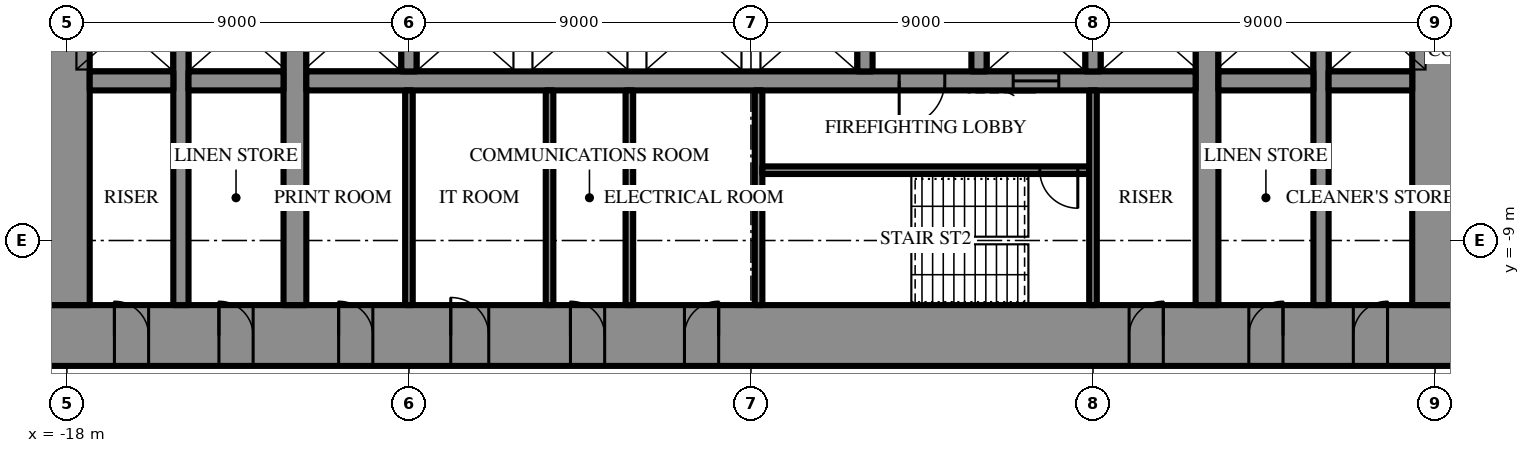
"""IFC4 building model, lengths in metres.
Left out: names, types, materials, properties, quantities, classifications, styles, units other than length and angle.
Written with IfcOpenShell. Run it as: python <this file> out.ifc"""

import sys

from ifc_helpers import new_model, si_unit, direction, frame, frame_2d, origin, place, context, subcontext, project, spatial, rectangle, extrude, element, fill, save


model = new_model("IFC4")
c1 = context("Model", 3, precision=1e-05, world=origin(), true_north=direction((0.0, 1.0)))
c2 = subcontext(c1, "Body", "Model", "MODEL_VIEW")
j1 = project(units=[si_unit("LENGTHUNIT", "METRE"), si_unit("PLANEANGLEUNIT", "RADIAN")], contexts=[c1])
p1 = place(None, origin())
s1 = spatial("IfcSite", under=j1, at=p1, CompositionType="ELEMENT")
p2 = place(p1, origin())
s2 = spatial("IfcBuilding", under=s1, at=p2, CompositionType="ELEMENT")
p3 = place(p2, frame((0.0, 0.0, 94.9)))
s3 = spatial("IfcBuildingStorey", under=s2, at=p3, CompositionType="ELEMENT", Elevation=94.9)
p4 = place(p3, frame((18.6, -11.5, 0.0), z_axis=(0.0, 0.0, 1.0), x_axis=(-1.0, 0.0, 0.0)))
e1 = element("IfcWall", 1, at=p4, inside=s3, PredefinedType="SHEAR", context=c2, shape_type="SweptSolid", body=[
    extrude(rectangle(XDim=37.2, YDim=1.6, at=frame_2d((18.6, 0.0))), origin(), (0.0, 0.0, 1.0), 4.2),
])
p5 = place(p4, frame((19.45, 0.0, 0.0)))
e2 = element("IfcOpeningElement", 2, at=p5, cuts=e1, PredefinedType="OPENING", context=c2, shape_type="SweptSolid", body=[
    extrude(rectangle(XDim=0.9, YDim=2.2, at=frame_2d((0.45, 1.1))), frame((0.0, 0.81, 0.0), z_axis=(0.0, -1.0, 0.0), x_axis=(1.0, 0.0, 0.0)), (0.0, 0.0, 1.0), 1.62),
])
p6 = place(p4, frame((22.45, 0.0, 0.0)))
e3 = element("IfcOpeningElement", 3, at=p6, cuts=e1, PredefinedType="OPENING", context=c2, shape_type="SweptSolid", body=[
    extrude(rectangle(XDim=0.9, YDim=2.2, at=frame_2d((0.45, 1.1))), frame((0.0, 0.81, 0.0), z_axis=(0.0, -1.0, 0.0), x_axis=(1.0, 0.0, 0.0)), (0.0, 0.0, 1.0), 1.62),
])
p7 = place(p4, frame((25.5, 0.0, 0.0)))
e4 = element("IfcOpeningElement", 4, at=p7, cuts=e1, PredefinedType="OPENING", context=c2, shape_type="SweptSolid", body=[
    extrude(rectangle(XDim=1.0, YDim=2.2, at=frame_2d((0.5, 1.1))), frame((0.0, 0.81, 0.0), z_axis=(0.0, -1.0, 0.0), x_axis=(1.0, 0.0, 0.0)), (0.0, 0.0, 1.0), 1.62),
])
p8 = place(p4, frame((1.85, 0.0, 0.0)))
e5 = element("IfcOpeningElement", 5, at=p8, cuts=e1, PredefinedType="OPENING", context=c2, shape_type="SweptSolid", body=[
    extrude(rectangle(XDim=0.9, YDim=2.2, at=frame_2d((0.45, 1.1))), frame((0.0, 0.81, 0.0), z_axis=(0.0, -1.0, 0.0), x_axis=(1.0, 0.0, 0.0)), (0.0, 0.0, 1.0), 1.62),
])
p9 = place(p4, frame((4.6, 0.0, 0.0)))
e6 = element("IfcOpeningElement", 6, at=p9, cuts=e1, PredefinedType="OPENING", context=c2, shape_type="SweptSolid", body=[
    extrude(rectangle(XDim=0.9, YDim=2.2, at=frame_2d((0.45, 1.1))), frame((0.0, 0.81, 0.0), z_axis=(0.0, -1.0, 0.0), x_axis=(1.0, 0.0, 0.0)), (0.0, 0.0, 1.0), 1.62),
])
p10 = place(p4, frame((7.75, 0.0, 0.0)))
e7 = element("IfcOpeningElement", 7, at=p10, cuts=e1, PredefinedType="OPENING", context=c2, shape_type="SweptSolid", body=[
    extrude(rectangle(XDim=0.9, YDim=2.2, at=frame_2d((0.45, 1.1))), frame((0.0, 0.81, 0.0), z_axis=(0.0, -1.0, 0.0), x_axis=(1.0, 0.0, 0.0)), (0.0, 0.0, 1.0), 1.62),
])
p11 = place(p4, frame((28.55, 0.0, 0.0)))
e8 = element("IfcOpeningElement", 8, at=p11, cuts=e1, PredefinedType="OPENING", context=c2, shape_type="SweptSolid", body=[
    extrude(rectangle(XDim=0.9, YDim=2.2, at=frame_2d((0.45, 1.1))), frame((0.0, 0.81, 0.0), z_axis=(0.0, -1.0, 0.0), x_axis=(1.0, 0.0, 0.0)), (0.0, 0.0, 1.0), 1.62),
])
p12 = place(p4, frame((31.7, 0.0, 0.0)))
e9 = element("IfcOpeningElement", 9, at=p12, cuts=e1, PredefinedType="OPENING", context=c2, shape_type="SweptSolid", body=[
    extrude(rectangle(XDim=0.9, YDim=2.2, at=frame_2d((0.45, 1.1))), frame((0.0, 0.81, 0.0), z_axis=(0.0, -1.0, 0.0), x_axis=(1.0, 0.0, 0.0)), (0.0, 0.0, 1.0), 1.62),
])
p13 = place(p4, frame((34.45, 0.0, 0.0)))
e10 = element("IfcOpeningElement", 10, at=p13, cuts=e1, PredefinedType="OPENING", context=c2, shape_type="SweptSolid", body=[
    extrude(rectangle(XDim=0.9, YDim=2.2, at=frame_2d((0.45, 1.1))), frame((0.0, 0.81, 0.0), z_axis=(0.0, -1.0, 0.0), x_axis=(1.0, 0.0, 0.0)), (0.0, 0.0, 1.0), 1.62),
])
p14 = place(p3, frame((18.0, -10.7, 0.0), z_axis=(0.0, 0.0, 1.0), x_axis=(0.0, 1.0, 0.0)))
e11 = element("IfcWall", 11, at=p14, inside=s3, PredefinedType="SHEAR", context=c2, shape_type="SweptSolid", body=[
    extrude(rectangle(XDim=21.4, YDim=1.2, at=frame_2d((10.7, 0.0))), origin(), (0.0, 0.0, 1.0), 4.2),
])
p15 = place(p14, frame((9.8, 0.0, 0.0)))
e12 = element("IfcOpeningElement", 12, at=p15, cuts=e11, PredefinedType="OPENING", context=c2, shape_type="SweptSolid", body=[
    extrude(rectangle(XDim=1.8, YDim=2.4, at=frame_2d((0.9, 1.2))), frame((0.0, 0.61, 0.0), z_axis=(0.0, -1.0, 0.0), x_axis=(1.0, 0.0, 0.0)), (0.0, 0.0, 1.0), 1.22),
])
p16 = place(p3, frame((-18.0, 10.7, 0.0), z_axis=(0.0, 0.0, 1.0), x_axis=(0.0, -1.0, 0.0)))
e13 = element("IfcWall", 13, at=p16, inside=s3, PredefinedType="SHEAR", context=c2, shape_type="SweptSolid", body=[
    extrude(rectangle(XDim=21.4, YDim=1.2, at=frame_2d((10.7, 0.0))), origin(), (0.0, 0.0, 1.0), 4.2),
])
p17 = place(p16, frame((9.8, 0.0, 0.0)))
e14 = element("IfcOpeningElement", 14, at=p17, cuts=e13, PredefinedType="OPENING", context=c2, shape_type="SweptSolid", body=[
    extrude(rectangle(XDim=1.8, YDim=2.4, at=frame_2d((0.9, 1.2))), frame((0.0, 0.61, 0.0), z_axis=(0.0, -1.0, 0.0), x_axis=(1.0, 0.0, 0.0)), (0.0, 0.0, 1.0), 1.22),
])
p18 = place(p3, frame((12.0, -10.7, 0.0), z_axis=(0.0, 0.0, 1.0), x_axis=(0.0, 1.0, 0.0)))
e15 = element("IfcWall", 15, at=p18, inside=s3, PredefinedType="SHEAR", context=c2, shape_type="SweptSolid", body=[
    extrude(rectangle(XDim=21.4, YDim=0.6, at=frame_2d((10.7, 0.0))), origin(), (0.0, 0.0, 1.0), 4.2),
])
p19 = place(p18, frame((9.8, 0.0, 0.0)))
e16 = element("IfcOpeningElement", 16, at=p19, cuts=e15, PredefinedType="OPENING", context=c2, shape_type="SweptSolid", body=[
    extrude(rectangle(XDim=1.8, YDim=2.4, at=frame_2d((0.9, 1.2))), frame((0.0, 0.31, 0.0), z_axis=(0.0, -1.0, 0.0), x_axis=(1.0, 0.0, 0.0)), (0.0, 0.0, 1.0), 0.62),
])
p20 = place(p3, frame((-12.0, -10.7, 0.0), z_axis=(0.0, 0.0, 1.0), x_axis=(0.0, 1.0, 0.0)))
e17 = element("IfcWall", 17, at=p20, inside=s3, PredefinedType="SHEAR", context=c2, shape_type="SweptSolid", body=[
    extrude(rectangle(XDim=21.4, YDim=0.6, at=frame_2d((10.7, 0.0))), origin(), (0.0, 0.0, 1.0), 4.2),
])
p21 = place(p20, frame((9.8, 0.0, 0.0)))
e18 = element("IfcOpeningElement", 18, at=p21, cuts=e17, PredefinedType="OPENING", context=c2, shape_type="SweptSolid", body=[
    extrude(rectangle(XDim=1.8, YDim=2.4, at=frame_2d((0.9, 1.2))), frame((0.0, 0.31, 0.0), z_axis=(0.0, -1.0, 0.0), x_axis=(1.0, 0.0, 0.0)), (0.0, 0.0, 1.0), 0.62),
])
p22 = place(p3, frame((15.0, -10.7, 0.0), z_axis=(0.0, 0.0, 1.0), x_axis=(0.0, 1.0, 0.0)))
e19 = element("IfcWall", 19, at=p22, inside=s3, PredefinedType="SHEAR", context=c2, shape_type="SweptSolid", body=[
    extrude(rectangle(XDim=21.4, YDim=0.4, at=frame_2d((10.7, 0.0))), origin(), (0.0, 0.0, 1.0), 4.2),
])
p23 = place(p22, frame((9.8, 0.0, 0.0)))
e20 = element("IfcOpeningElement", 20, at=p23, cuts=e19, PredefinedType="OPENING", context=c2, shape_type="SweptSolid", body=[
    extrude(rectangle(XDim=1.8, YDim=2.4, at=frame_2d((0.9, 1.2))), frame((0.0, 0.21, 0.0), z_axis=(0.0, -1.0, 0.0), x_axis=(1.0, 0.0, 0.0)), (0.0, 0.0, 1.0), 0.42),
])
p24 = place(p3, frame((-15.0, -10.7, 0.0), z_axis=(0.0, 0.0, 1.0), x_axis=(0.0, 1.0, 0.0)))
e21 = element("IfcWall", 21, at=p24, inside=s3, PredefinedType="SHEAR", context=c2, shape_type="SweptSolid", body=[
    extrude(rectangle(XDim=21.4, YDim=0.4, at=frame_2d((10.7, 0.0))), origin(), (0.0, 0.0, 1.0), 4.2),
])
p25 = place(p24, frame((9.8, 0.0, 0.0)))
e22 = element("IfcOpeningElement", 22, at=p25, cuts=e21, PredefinedType="OPENING", context=c2, shape_type="SweptSolid", body=[
    extrude(rectangle(XDim=1.8, YDim=2.4, at=frame_2d((0.9, 1.2))), frame((0.0, 0.21, 0.0), z_axis=(0.0, -1.0, 0.0), x_axis=(1.0, 0.0, 0.0)), (0.0, 0.0, 1.0), 0.42),
])
p26 = place(p3, frame((17.4, -4.8, 0.0), z_axis=(0.0, 0.0, 1.0), x_axis=(-1.0, 0.0, 0.0)))
e23 = element("IfcWall", 23, at=p26, inside=s3, PredefinedType="SHEAR", context=c2, shape_type="SweptSolid", body=[
    extrude(rectangle(XDim=2.2, YDim=0.5, at=frame_2d((1.1, 0.0))), origin(), (0.0, 0.0, 1.0), 4.2),
])
p27 = place(p3, frame((14.8, -4.8, 0.0), z_axis=(0.0, 0.0, 1.0), x_axis=(-1.0, 0.0, 0.0)))
e24 = element("IfcWall", 24, at=p27, inside=s3, PredefinedType="SHEAR", context=c2, shape_type="SweptSolid", body=[
    extrude(rectangle(XDim=2.5, YDim=0.5, at=frame_2d((1.25, 0.0))), origin(), (0.0, 0.0, 1.0), 4.2),
])
p28 = place(p3, frame((11.7, -4.8, 0.0), z_axis=(0.0, 0.0, 1.0), x_axis=(-1.0, 0.0, 0.0)))
e25 = element("IfcWall", 25, at=p28, inside=s3, PredefinedType="SHEAR", context=c2, shape_type="SweptSolid", body=[
    extrude(rectangle(XDim=23.4, YDim=0.5, at=frame_2d((11.7, 0.0))), origin(), (0.0, 0.0, 1.0), 4.2),
])
p29 = place(p28, frame((6.6, 0.0, 0.0)))
e26 = element("IfcOpeningElement", 26, at=p29, cuts=e25, PredefinedType="OPENING", context=c2, shape_type="SweptSolid", body=[
    extrude(rectangle(XDim=1.2, YDim=2.2, at=frame_2d((0.6, 1.1))), frame((0.0, 0.26, 0.0), z_axis=(0.0, -1.0, 0.0), x_axis=(1.0, 0.0, 0.0)), (0.0, 0.0, 1.0), 0.52),
])
p30 = place(p28, frame((3.6, 0.0, 0.0)))
e27 = element("IfcOpeningElement", 27, at=p30, cuts=e25, PredefinedType="OPENING", context=c2, shape_type="SweptSolid", body=[
    extrude(rectangle(XDim=1.2, YDim=2.2, at=frame_2d((0.6, 1.1))), frame((0.0, 0.26, 0.0), z_axis=(0.0, -1.0, 0.0), x_axis=(1.0, 0.0, 0.0)), (0.0, 0.0, 1.0), 0.52),
])
p31 = place(p3, frame((-12.3, -4.8, 0.0), z_axis=(0.0, 0.0, 1.0), x_axis=(-1.0, 0.0, 0.0)))
e28 = element("IfcWall", 28, at=p31, inside=s3, PredefinedType="SHEAR", context=c2, shape_type="SweptSolid", body=[
    extrude(rectangle(XDim=2.5, YDim=0.5, at=frame_2d((1.25, 0.0))), origin(), (0.0, 0.0, 1.0), 4.2),
])
p32 = place(p3, frame((-15.2, -4.8, 0.0), z_axis=(0.0, 0.0, 1.0), x_axis=(-1.0, 0.0, 0.0)))
e29 = element("IfcWall", 29, at=p32, inside=s3, PredefinedType="SHEAR", context=c2, shape_type="SweptSolid", body=[
    extrude(rectangle(XDim=2.2, YDim=0.5, at=frame_2d((1.1, 0.0))), origin(), (0.0, 0.0, 1.0), 4.2),
])
for number, where, z_axis, x_axis in (
    (30, (9.0, -2.25, 0.0), (0.0, 0.0, 1.0), (0.0, -1.0, 0.0)),
    (31, (6.0, -2.25, 0.0), (0.0, 0.0, 1.0), (0.0, -1.0, 0.0)),
    (32, (3.0, -2.25, 0.0), (0.0, 0.0, 1.0), (0.0, -1.0, 0.0)),
    (33, (-9.0, -2.25, 0.0), (0.0, 0.0, 1.0), (0.0, -1.0, 0.0)),
):
    element("IfcWall", number, at=place(p3, frame(where, z_axis=z_axis, x_axis=x_axis)), inside=s3, PredefinedType="SHEAR", context=c2, shape_type="SweptSolid", body=[
        extrude(rectangle(XDim=2.3, YDim=0.4, at=frame_2d((1.15, 0.0))), origin(), (0.0, 0.0, 1.0), 4.2),
    ])
p33 = place(p3, frame((0.2, -5.05, 0.0), z_axis=(0.0, 0.0, 1.0), x_axis=(0.0, -1.0, 0.0)))
e34 = element("IfcWall", 34, at=p33, inside=s3, PredefinedType="SHEAR", context=c2, shape_type="SweptSolid", body=[
    extrude(rectangle(XDim=5.65, YDim=0.2, at=frame_2d((2.825, 0.0))), origin(), (0.0, 0.0, 1.0), 4.2),
])
p34 = place(p3, frame((8.9, -7.15, 0.0), z_axis=(0.0, 0.0, 1.0), x_axis=(-1.0, 0.0, 0.0)))
e35 = element("IfcWall", 35, at=p34, inside=s3, PredefinedType="SHEAR", context=c2, shape_type="SweptSolid", body=[
    extrude(rectangle(XDim=8.6, YDim=0.2, at=frame_2d((4.3, 0.0))), origin(), (0.0, 0.0, 1.0), 4.2),
])
p35 = place(p34, frame((0.3, 0.0, 0.0)))
e36 = element("IfcOpeningElement", 36, at=p35, cuts=e35, PredefinedType="OPENING", context=c2, shape_type="SweptSolid", body=[
    extrude(rectangle(XDim=1.0, YDim=2.2, at=frame_2d((0.5, 1.1))), frame((0.0, 0.11, 0.0), z_axis=(0.0, -1.0, 0.0), x_axis=(1.0, 0.0, 0.0)), (0.0, 0.0, 1.0), 0.22),
])
for number, where, z_axis, x_axis in (
    (37, (9.0, -5.05, 0.0), (0.0, 0.0, 1.0), (0.0, -1.0, 0.0)),
    (38, (-9.0, -5.05, 0.0), (0.0, 0.0, 1.0), (0.0, -1.0, 0.0)),
    (39, (-3.2, -5.05, 0.0), (0.0, 0.0, 1.0), (0.0, -1.0, 0.0)),
    (40, (-5.3, -5.05, 0.0), (0.0, 0.0, 1.0), (0.0, -1.0, 0.0)),
):
    element("IfcWall", number, at=place(p3, frame(where, z_axis=z_axis, x_axis=x_axis)), inside=s3, PredefinedType="PARTITIONING", context=c2, shape_type="SweptSolid", body=[
        extrude(rectangle(XDim=5.65, YDim=0.2, at=frame_2d((2.825, 0.0))), origin(), (0.0, 0.0, 1.0), 4.0),
    ])
p36 = place(p29, origin())
e41 = element("IfcDoor", 41, at=p36, inside=s3, OperationType="SINGLE_SWING_LEFT", PredefinedType="DOOR", context=c2, shape_type="SweptSolid", body=[
    extrude(rectangle(XDim=1.2, YDim=2.2, at=frame_2d((0.6, 1.1))), frame((0.0, 0.025, 0.0), z_axis=(0.0, -1.0, 0.0), x_axis=(1.0, 0.0, 0.0)), (0.0, 0.0, 1.0), 0.05),
])
fill(e26, e41)
p37 = place(p35, origin())
e42 = element("IfcDoor", 42, at=p37, inside=s3, OperationType="SINGLE_SWING_RIGHT", PredefinedType="DOOR", context=c2, shape_type="SweptSolid", body=[
    extrude(rectangle(XDim=1.0, YDim=2.2, at=frame_2d((0.5, 1.1))), frame((0.0, 0.025, 0.0), z_axis=(0.0, -1.0, 0.0), x_axis=(1.0, 0.0, 0.0)), (0.0, 0.0, 1.0), 0.05),
])
fill(e36, e42)
p38 = place(p5, frame((0.9, 0.0, 0.0), z_axis=(0.0, 0.0, 1.0), x_axis=(-1.0, 0.0, 0.0)))
e43 = element("IfcDoor", 43, at=p38, inside=s3, OperationType="SINGLE_SWING_LEFT", PredefinedType="DOOR", context=c2, shape_type="SweptSolid", body=[
    extrude(rectangle(XDim=0.9, YDim=2.2, at=frame_2d((0.45, 1.1))), frame((0.0, 0.025, 0.0), z_axis=(0.0, -1.0, 0.0), x_axis=(1.0, 0.0, 0.0)), (0.0, 0.0, 1.0), 0.05),
])
fill(e2, e43)
p39 = place(p6, frame((0.9, 0.0, 0.0), z_axis=(0.0, 0.0, 1.0), x_axis=(-1.0, 0.0, 0.0)))
e44 = element("IfcDoor", 44, at=p39, inside=s3, OperationType="SINGLE_SWING_RIGHT", PredefinedType="DOOR", context=c2, shape_type="SweptSolid", body=[
    extrude(rectangle(XDim=0.9, YDim=2.2, at=frame_2d((0.45, 1.1))), frame((0.0, 0.025, 0.0), z_axis=(0.0, -1.0, 0.0), x_axis=(1.0, 0.0, 0.0)), (0.0, 0.0, 1.0), 0.05),
])
fill(e3, e44)
p40 = place(p7, frame((1.0, 0.0, 0.0), z_axis=(0.0, 0.0, 1.0), x_axis=(-1.0, 0.0, 0.0)))
e45 = element("IfcDoor", 45, at=p40, inside=s3, OperationType="SINGLE_SWING_RIGHT", PredefinedType="DOOR", context=c2, shape_type="SweptSolid", body=[
    extrude(rectangle(XDim=1.0, YDim=2.2, at=frame_2d((0.5, 1.1))), frame((0.0, 0.025, 0.0), z_axis=(0.0, -1.0, 0.0), x_axis=(1.0, 0.0, 0.0)), (0.0, 0.0, 1.0), 0.05),
])
fill(e4, e45)
p41 = place(p8, frame((0.9, 0.0, 0.0), z_axis=(0.0, 0.0, 1.0), x_axis=(-1.0, 0.0, 0.0)))
e46 = element("IfcDoor", 46, at=p41, inside=s3, OperationType="SINGLE_SWING_LEFT", PredefinedType="DOOR", context=c2, shape_type="SweptSolid", body=[
    extrude(rectangle(XDim=0.9, YDim=2.2, at=frame_2d((0.45, 1.1))), frame((0.0, 0.025, 0.0), z_axis=(0.0, -1.0, 0.0), x_axis=(1.0, 0.0, 0.0)), (0.0, 0.0, 1.0), 0.05),
])
fill(e5, e46)
p42 = place(p9, frame((0.9, 0.0, 0.0), z_axis=(0.0, 0.0, 1.0), x_axis=(-1.0, 0.0, 0.0)))
e47 = element("IfcDoor", 47, at=p42, inside=s3, OperationType="SINGLE_SWING_LEFT", PredefinedType="DOOR", context=c2, shape_type="SweptSolid", body=[
    extrude(rectangle(XDim=0.9, YDim=2.2, at=frame_2d((0.45, 1.1))), frame((0.0, 0.025, 0.0), z_axis=(0.0, -1.0, 0.0), x_axis=(1.0, 0.0, 0.0)), (0.0, 0.0, 1.0), 0.05),
])
fill(e6, e47)
p43 = place(p10, frame((0.9, 0.0, 0.0), z_axis=(0.0, 0.0, 1.0), x_axis=(-1.0, 0.0, 0.0)))
e48 = element("IfcDoor", 48, at=p43, inside=s3, OperationType="SINGLE_SWING_LEFT", PredefinedType="DOOR", context=c2, shape_type="SweptSolid", body=[
    extrude(rectangle(XDim=0.9, YDim=2.2, at=frame_2d((0.45, 1.1))), frame((0.0, 0.025, 0.0), z_axis=(0.0, -1.0, 0.0), x_axis=(1.0, 0.0, 0.0)), (0.0, 0.0, 1.0), 0.05),
])
fill(e7, e48)
p44 = place(p11, frame((0.9, 0.0, 0.0), z_axis=(0.0, 0.0, 1.0), x_axis=(-1.0, 0.0, 0.0)))
e49 = element("IfcDoor", 49, at=p44, inside=s3, OperationType="SINGLE_SWING_RIGHT", PredefinedType="DOOR", context=c2, shape_type="SweptSolid", body=[
    extrude(rectangle(XDim=0.9, YDim=2.2, at=frame_2d((0.45, 1.1))), frame((0.0, 0.025, 0.0), z_axis=(0.0, -1.0, 0.0), x_axis=(1.0, 0.0, 0.0)), (0.0, 0.0, 1.0), 0.05),
])
fill(e8, e49)
p45 = place(p12, frame((0.9, 0.0, 0.0), z_axis=(0.0, 0.0, 1.0), x_axis=(-1.0, 0.0, 0.0)))
e50 = element("IfcDoor", 50, at=p45, inside=s3, OperationType="SINGLE_SWING_RIGHT", PredefinedType="DOOR", context=c2, shape_type="SweptSolid", body=[
    extrude(rectangle(XDim=0.9, YDim=2.2, at=frame_2d((0.45, 1.1))), frame((0.0, 0.025, 0.0), z_axis=(0.0, -1.0, 0.0), x_axis=(1.0, 0.0, 0.0)), (0.0, 0.0, 1.0), 0.05),
])
fill(e9, e50)
p46 = place(p13, frame((0.9, 0.0, 0.0), z_axis=(0.0, 0.0, 1.0), x_axis=(-1.0, 0.0, 0.0)))
e51 = element("IfcDoor", 51, at=p46, inside=s3, OperationType="SINGLE_SWING_RIGHT", PredefinedType="DOOR", context=c2, shape_type="SweptSolid", body=[
    extrude(rectangle(XDim=0.9, YDim=2.2, at=frame_2d((0.45, 1.1))), frame((0.0, 0.025, 0.0), z_axis=(0.0, -1.0, 0.0), x_axis=(1.0, 0.0, 0.0)), (0.0, 0.0, 1.0), 0.05),
])
fill(e10, e51)
p47 = place(p30, origin())
e52 = element("IfcDoor", 52, at=p47, inside=s3, OperationType="SLIDING_TO_LEFT", PredefinedType="DOOR", context=c2, shape_type="SweptSolid", body=[
    extrude(rectangle(XDim=1.2, YDim=2.2, at=frame_2d((0.6, 1.1))), frame((0.0, 0.025, 0.0), z_axis=(0.0, -1.0, 0.0), x_axis=(1.0, 0.0, 0.0)), (0.0, 0.0, 1.0), 0.05),
])
fill(e27, e52)
save(model, sys.argv[1])
